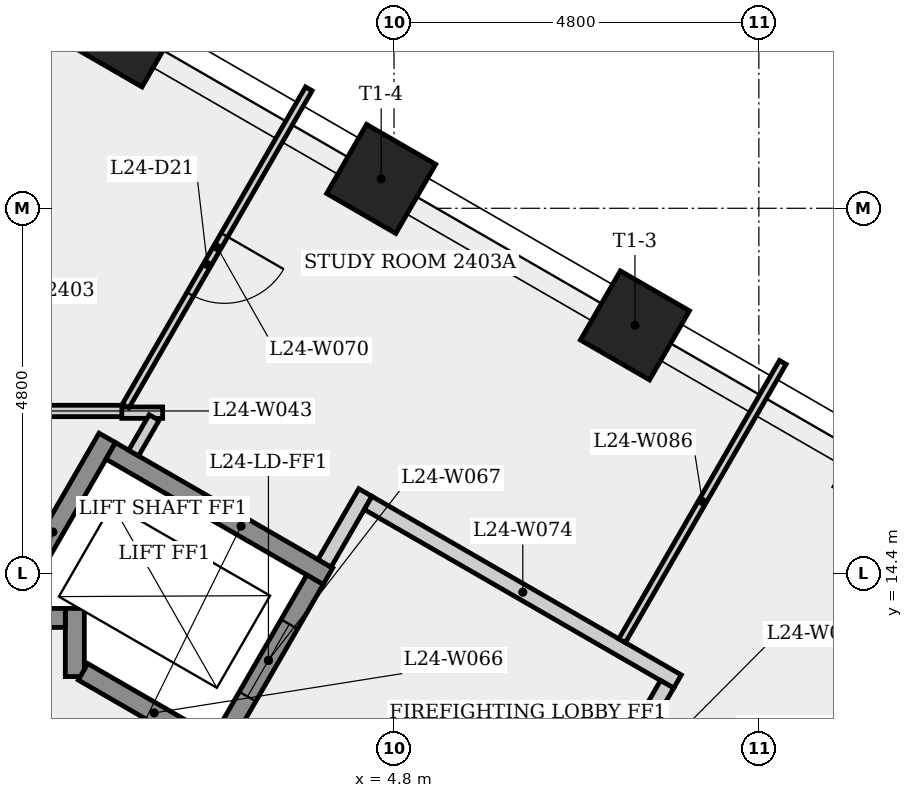
"""IFC4 building model, lengths in metres.
Left out: names, types, materials, properties, quantities, classifications, styles, units other than length and angle.
Written with IfcOpenShell. Run it as: python <this file> out.ifc"""

import sys

from ifc_helpers import new_model, si_unit, direction, frame, frame_2d, origin, origin_2d, place, context, subcontext, project, spatial, rectangle, extrude, element, fill, save


model = new_model("IFC4")
c1 = context("Model", 3, precision=1e-05, world=origin(), true_north=direction((0.0, 1.0)))
c2 = subcontext(c1, "Body", "Model", "MODEL_VIEW")
j1 = project(units=[si_unit("LENGTHUNIT", "METRE"), si_unit("PLANEANGLEUNIT", "RADIAN")], contexts=[c1])
p1 = place(None, origin())
s1 = spatial("IfcSite", under=j1, at=p1, CompositionType="ELEMENT")
p2 = place(p1, origin())
s2 = spatial("IfcBuilding", under=s1, at=p2, CompositionType="ELEMENT")
p3 = place(p2, frame((0.0, 0.0, 93.3)))
s3 = spatial("IfcBuildingStorey", under=s2, at=p3, CompositionType="ELEMENT", Elevation=93.3)
for number, where, z_axis, x_axis in (
    (1, (7.969, 17.659, 0.0), (0.0, 0.0, 1.0), (0.5, 0.866, 0.0)),
    (2, (4.631, 19.586, 0.0), (0.0, 0.0, 1.0), (0.5, 0.866, 0.0)),
    (3, (1.292, 21.514, 0.0), (0.0, 0.0, 1.0), (0.5, 0.866, 0.0)),
):
    element("IfcColumn", number, at=place(p3, frame(where, z_axis=z_axis, x_axis=x_axis)), inside=s3, PredefinedType="COLUMN", context=c2, shape_type="SweptSolid", body=[
        extrude(rectangle(XDim=1.05, YDim=1.05, at=origin_2d()), origin(), (0.0, 0.0, 1.0), 3.4),
    ])
p4 = place(p3, frame((-3.144, 16.533, 0.0), z_axis=(0.0, 0.0, 1.0), x_axis=(1.0, 0.0, 0.0)))
e4 = element("IfcWall", 4, at=p4, inside=s3, PredefinedType="PARTITIONING", context=c2, shape_type="SweptSolid", body=[
    extrude(rectangle(XDim=4.425, YDim=0.15, at=frame_2d((2.212, 0.0))), origin(), (0.0, 0.0, 1.0), 3.05),
])
p5 = place(p4, frame((1.713, 0.0, 0.0)))
e5 = element("IfcOpeningElement", 5, at=p5, cuts=e4, PredefinedType="OPENING", context=c2, shape_type="SweptSolid", body=[
    extrude(rectangle(XDim=1.0, YDim=2.1, at=frame_2d((0.5, 1.05))), frame((0.0, 0.085, 0.0), z_axis=(0.0, -1.0, 0.0), x_axis=(1.0, 0.0, 0.0)), (0.0, 0.0, 1.0), 0.17),
])
p6 = place(p3, frame((-0.403, 13.702, 0.0), z_axis=(0.0, 0.0, 1.0), x_axis=(0.499976111731, 0.866039195244, 0.0)))
e6 = element("IfcWall", 6, at=p6, inside=s3, PredefinedType="SHEAR", context=c2, shape_type="SweptSolid", body=[
    extrude(rectangle(XDim=2.861, YDim=0.25, at=frame_2d((1.43, 0.0))), origin(), (0.0, 0.0, 1.0), 3.05),
])
p7 = place(p3, frame((0.6, 13.039, 0.0), z_axis=(0.0, 0.0, 1.0), x_axis=(0.0, 1.0, 0.0)))
e7 = element("IfcWall", 7, at=p7, inside=s3, PredefinedType="SHEAR", context=c2, shape_type="SweptSolid", body=[
    extrude(rectangle(XDim=0.896, YDim=0.25, at=frame_2d((0.448, 0.0))), origin(), (0.0, 0.0, 1.0), 3.05),
])
p8 = place(p3, frame((0.475, 13.81, 0.0), z_axis=(0.0, 0.0, 1.0), x_axis=(-1.0, 0.0, 0.0)))
e8 = element("IfcWall", 8, at=p8, inside=s3, PredefinedType="SHEAR", context=c2, shape_type="SweptSolid", body=[
    extrude(rectangle(XDim=0.691, YDim=0.25, at=frame_2d((0.345, 0.0))), origin(), (0.0, 0.0, 1.0), 3.4),
])
p9 = place(p3, frame((1.073, 16.008, 0.0), z_axis=(0.0, 0.0, 1.0), x_axis=(0.866040211805, -0.499974350878, 0.0)))
e9 = element("IfcWall", 9, at=p9, inside=s3, PredefinedType="SHEAR", context=c2, shape_type="SweptSolid", body=[
    extrude(rectangle(XDim=3.3, YDim=0.25, at=frame_2d((1.65, 0.0))), origin(), (0.0, 0.0, 1.0), 3.05),
])
p10 = place(p3, frame((1.219, 16.511, 0.0), z_axis=(0.0, 0.0, 1.0), x_axis=(1.0, 0.0, 0.0)))
e10 = element("IfcWall", 10, at=p10, inside=s3, PredefinedType="PARTITIONING", context=c2, shape_type="SweptSolid", body=[
    extrude(rectangle(XDim=0.537, YDim=0.15, at=frame_2d((0.269, 0.0))), origin(), (0.0, 0.0, 1.0), 3.05),
])
p11 = place(p3, frame((1.643, 16.446, 0.0), z_axis=(0.0, 0.0, 1.0), x_axis=(-0.500179556555, -0.865921711937, 0.0)))
e11 = element("IfcWall", 11, at=p11, inside=s3, PredefinedType="PARTITIONING", context=c2, shape_type="SweptSolid", body=[
    extrude(rectangle(XDim=0.539, YDim=0.15, at=frame_2d((0.27, 0.0))), origin(), (0.0, 0.0, 1.0), 3.05),
])
p12 = place(p3, frame((2.581, 12.02, 0.0), z_axis=(0.0, 0.0, 1.0), x_axis=(-0.86603892542, 0.499976579108, 0.0)))
e12 = element("IfcWall", 12, at=p12, inside=s3, PredefinedType="SHEAR", context=c2, shape_type="SweptSolid", body=[
    extrude(rectangle(XDim=2.162, YDim=0.25, at=frame_2d((1.081, 0.0))), origin(), (0.0, 0.0, 1.0), 3.05),
])
p13 = place(p3, frame((2.535, 12.191, 0.0), z_axis=(0.0, 0.0, 1.0), x_axis=(0.500061746146, 0.865989751695, 0.0)))
e13 = element("IfcWall", 13, at=p13, inside=s3, PredefinedType="SHEAR", context=c2, shape_type="SweptSolid", body=[
    extrude(rectangle(XDim=2.45, YDim=0.25, at=frame_2d((1.225, 0.0))), origin(), (0.0, 0.0, 1.0), 3.4),
])
p14 = place(p13, frame((0.675, 0.0, 0.0)))
e14 = element("IfcOpeningElement", 14, at=p14, cuts=e13, PredefinedType="OPENING", context=c2, shape_type="SweptSolid", body=[
    extrude(rectangle(XDim=1.1, YDim=2.1, at=frame_2d((0.55, 1.05))), frame((0.0, 0.135, 0.0), z_axis=(0.0, -1.0, 0.0), x_axis=(1.0, 0.0, 0.0)), (0.0, 0.0, 1.0), 0.27),
])
p15 = place(p3, frame((3.679, 20.772, 0.0), z_axis=(0.0, 0.0, 1.0), x_axis=(-0.500023547092, -0.866011808438, 0.0)))
e15 = element("IfcWall", 15, at=p15, inside=s3, PredefinedType="PARTITIONING", context=c2, shape_type="SweptSolid", body=[
    extrude(rectangle(XDim=4.82, YDim=0.1, at=frame_2d((2.41, 0.0))), origin(), (0.0, 0.0, 1.0), 3.05),
])
p16 = place(p15, frame((2.22, 0.0, 0.0)))
e16 = element("IfcOpeningElement", 16, at=p16, cuts=e15, PredefinedType="OPENING", context=c2, shape_type="SweptSolid", body=[
    extrude(rectangle(XDim=0.9, YDim=2.1, at=frame_2d((0.45, 1.05))), frame((0.0, 0.06, 0.0), z_axis=(0.0, -1.0, 0.0), x_axis=(1.0, 0.0, 0.0)), (0.0, 0.0, 1.0), 0.12),
])
p17 = place(p3, frame((3.885, 14.529, 0.0), z_axis=(0.0, 0.0, 1.0), x_axis=(0.499997628298, 0.866026773083, 0.0)))
e17 = element("IfcWall", 17, at=p17, inside=s3, PredefinedType="PARTITIONING", context=c2, shape_type="SweptSolid", body=[
    extrude(rectangle(XDim=1.075, YDim=0.2, at=frame_2d((0.538, 0.0))), origin(), (0.0, 0.0, 1.0), 3.05),
])
p18 = place(p3, frame((4.459, 15.323, 0.0), z_axis=(0.0, 0.0, 1.0), x_axis=(0.866016039709, -0.500016218704, 0.0)))
e18 = element("IfcWall", 18, at=p18, inside=s3, PredefinedType="PARTITIONING", context=c2, shape_type="SweptSolid", body=[
    extrude(rectangle(XDim=4.7, YDim=0.2, at=frame_2d((2.35, 0.0))), origin(), (0.0, 0.0, 1.0), 3.05),
])
p19 = place(p3, frame((6.48, 9.624, 0.0), z_axis=(0.0, 0.0, 1.0), x_axis=(0.500017246033, 0.866015446554, 0.0)))
e19 = element("IfcWall", 19, at=p19, inside=s3, PredefinedType="SHEAR", context=c2, shape_type="SweptSolid", body=[
    extrude(rectangle(XDim=3.25, YDim=0.25, at=frame_2d((1.625, 0.0))), origin(), (0.0, 0.0, 1.0), 3.05),
])
p20 = place(p19, frame((1.125, 0.0, 0.0)))
e20 = element("IfcOpeningElement", 20, at=p20, cuts=e19, PredefinedType="OPENING", context=c2, shape_type="SweptSolid", body=[
    extrude(rectangle(XDim=1.0, YDim=2.1, at=frame_2d((0.5, 1.05))), frame((0.0, 0.135, 0.0), z_axis=(0.0, -1.0, 0.0), x_axis=(1.0, 0.0, 0.0)), (0.0, 0.0, 1.0), 0.27),
])
p21 = place(p3, frame((7.8, 13.51, 0.0), z_axis=(0.0, 0.0, 1.0), x_axis=(0.499988999718, 0.866031754707, 0.0)))
e21 = element("IfcWall", 21, at=p21, inside=s3, PredefinedType="PARTITIONING", context=c2, shape_type="SweptSolid", body=[
    extrude(rectangle(XDim=4.229, YDim=0.1, at=frame_2d((2.114, 0.0))), origin(), (0.0, 0.0, 1.0), 3.05),
])
p22 = place(p3, frame((8.393, 12.937, 0.0), z_axis=(0.0, 0.0, 1.0), x_axis=(-0.500065409566, -0.86598763626, 0.0)))
e22 = element("IfcWall", 22, at=p22, inside=s3, PredefinedType="PARTITIONING", context=c2, shape_type="SweptSolid", body=[
    extrude(rectangle(XDim=0.575, YDim=0.2, at=frame_2d((0.288, 0.0))), origin(), (0.0, 0.0, 1.0), 3.05),
])
p23 = place(p14, origin())
e23 = element("IfcDoor", 23, at=p23, inside=s3, OperationType="SLIDING_TO_LEFT", PredefinedType="DOOR", context=c2, shape_type="SweptSolid", body=[
    extrude(rectangle(XDim=1.1, YDim=2.1, at=frame_2d((0.55, 1.05))), frame((0.0, 0.025, 0.0), z_axis=(0.0, -1.0, 0.0), x_axis=(1.0, 0.0, 0.0)), (0.0, 0.0, 1.0), 0.05),
])
fill(e14, e23)
p24 = place(p16, origin())
e24 = element("IfcDoor", 24, at=p24, inside=s3, OperationType="SINGLE_SWING_LEFT", PredefinedType="DOOR", context=c2, shape_type="SweptSolid", body=[
    extrude(rectangle(XDim=0.9, YDim=2.1, at=frame_2d((0.45, 1.05))), frame((0.0, 0.025, 0.0), z_axis=(0.0, -1.0, 0.0), x_axis=(1.0, 0.0, 0.0)), (0.0, 0.0, 1.0), 0.05),
])
fill(e16, e24)
save(model, sys.argv[1])
